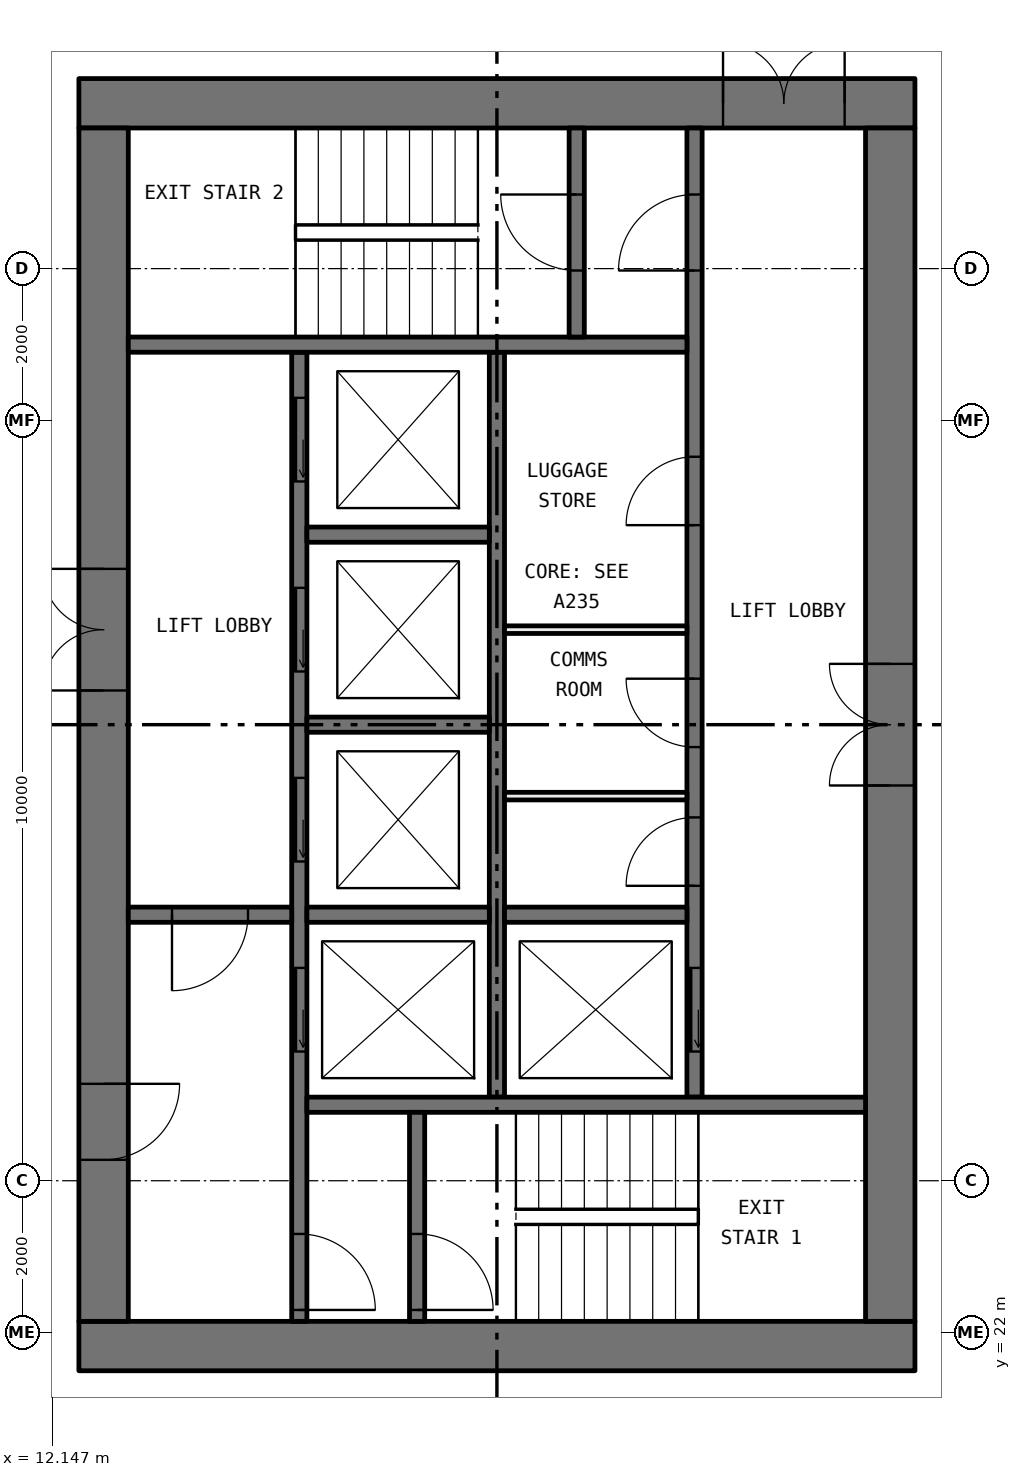
"""IFC4 building model, lengths in metres.
Left out: names, types, materials, properties, quantities, classifications, styles, units other than length and angle.
Written with IfcOpenShell. Run it as: python <this file> out.ifc"""

import sys

from ifc_helpers import new_model, si_unit, direction, frame, frame_2d, origin, place, context, subcontext, project, spatial, rectangle, extrude, element, fill, save


model = new_model("IFC4")
c1 = context("Model", 3, precision=1e-05, world=origin(), true_north=direction((0.0, 1.0)))
c2 = subcontext(c1, "Body", "Model", "MODEL_VIEW")
j1 = project(units=[si_unit("LENGTHUNIT", "METRE"), si_unit("PLANEANGLEUNIT", "RADIAN")], contexts=[c1])
p1 = place(None, origin())
s1 = spatial("IfcSite", under=j1, at=p1, CompositionType="ELEMENT")
p2 = place(p1, origin())
s2 = spatial("IfcBuilding", under=s1, at=p2, CompositionType="ELEMENT")
p3 = place(p2, frame((0.0, 0.0, 131.1)))
s3 = spatial("IfcBuildingStorey", under=s2, at=p3, CompositionType="ELEMENT", Elevation=131.1)
p4 = place(p3, frame((12.5, 21.825, 0.0), z_axis=(0.0, 0.0, 1.0), x_axis=(1.0, 0.0, 0.0)))
e1 = element("IfcWall", 1, at=p4, inside=s3, PredefinedType="SHEAR", context=c2, shape_type="SweptSolid", body=[
    extrude(rectangle(XDim=11.0, YDim=0.65, at=frame_2d((5.5, 0.0))), origin(), (0.0, 0.0, 1.0), 3.05),
])
p5 = place(p3, frame((12.5, 38.175, 0.0), z_axis=(0.0, 0.0, 1.0), x_axis=(1.0, 0.0, 0.0)))
e2 = element("IfcWall", 2, at=p5, inside=s3, PredefinedType="SHEAR", context=c2, shape_type="SweptSolid", body=[
    extrude(rectangle(XDim=11.0, YDim=0.65, at=frame_2d((5.5, 0.0))), origin(), (0.0, 0.0, 1.0), 3.05),
])
p6 = place(p5, frame((8.475, 0.0, 0.0)))
e3 = element("IfcOpeningElement", 3, at=p6, cuts=e2, PredefinedType="OPENING", context=c2, shape_type="SweptSolid", body=[
    extrude(rectangle(XDim=1.6, YDim=2.1, at=frame_2d((0.8, 1.05))), frame((0.0, 0.335, 0.0), z_axis=(0.0, -1.0, 0.0), x_axis=(1.0, 0.0, 0.0)), (0.0, 0.0, 1.0), 0.67),
])
p7 = place(p3, frame((12.825, 22.15, 0.0), z_axis=(0.0, 0.0, 1.0), x_axis=(0.0, 1.0, 0.0)))
e4 = element("IfcWall", 4, at=p7, inside=s3, PredefinedType="SHEAR", context=c2, shape_type="SweptSolid", body=[
    extrude(rectangle(XDim=15.7, YDim=0.65, at=frame_2d((7.85, 0.0))), origin(), (0.0, 0.0, 1.0), 3.05),
])
p8 = place(p7, frame((8.3, 0.0, 0.0)))
e5 = element("IfcOpeningElement", 5, at=p8, cuts=e4, PredefinedType="OPENING", context=c2, shape_type="SweptSolid", body=[
    extrude(rectangle(XDim=1.6, YDim=2.1, at=frame_2d((0.8, 1.05))), frame((0.0, 0.335, 0.0), z_axis=(0.0, -1.0, 0.0), x_axis=(1.0, 0.0, 0.0)), (0.0, 0.0, 1.0), 0.67),
])
p9 = place(p7, frame((2.125, 0.0, 0.0)))
e6 = element("IfcOpeningElement", 6, at=p9, cuts=e4, PredefinedType="OPENING", context=c2, shape_type="SweptSolid", body=[
    extrude(rectangle(XDim=1.0, YDim=2.1, at=frame_2d((0.5, 1.05))), frame((0.0, 0.335, 0.0), z_axis=(0.0, -1.0, 0.0), x_axis=(1.0, 0.0, 0.0)), (0.0, 0.0, 1.0), 0.67),
])
p10 = place(p3, frame((23.175, 22.15, 0.0), z_axis=(0.0, 0.0, 1.0), x_axis=(0.0, 1.0, 0.0)))
e7 = element("IfcWall", 7, at=p10, inside=s3, PredefinedType="SHEAR", context=c2, shape_type="SweptSolid", body=[
    extrude(rectangle(XDim=15.7, YDim=0.65, at=frame_2d((7.85, 0.0))), origin(), (0.0, 0.0, 1.0), 3.05),
])
p11 = place(p10, frame((7.05, 0.0, 0.0)))
e8 = element("IfcOpeningElement", 8, at=p11, cuts=e7, PredefinedType="OPENING", context=c2, shape_type="SweptSolid", body=[
    extrude(rectangle(XDim=1.6, YDim=2.1, at=frame_2d((0.8, 1.05))), frame((0.0, 0.335, 0.0), z_axis=(0.0, -1.0, 0.0), x_axis=(1.0, 0.0, 0.0)), (0.0, 0.0, 1.0), 0.67),
])
p12 = place(p3, frame((15.4, 22.15, 0.0), z_axis=(0.0, 0.0, 1.0), x_axis=(0.0, 1.0, 0.0)))
e9 = element("IfcWall", 9, at=p12, inside=s3, PredefinedType="SOLIDWALL", context=c2, shape_type="SweptSolid", body=[
    extrude(rectangle(XDim=12.75, YDim=0.2, at=frame_2d((6.375, 0.0))), origin(), (0.0, 0.0, 1.0), 3.05),
])
p13 = place(p12, frame((3.55, 0.0, 0.0)))
e10 = element("IfcOpeningElement", 10, at=p13, cuts=e9, PredefinedType="OPENING", context=c2, shape_type="SweptSolid", body=[
    extrude(rectangle(XDim=1.1, YDim=2.1, at=frame_2d((0.55, 1.05))), frame((0.0, 0.11, 0.0), z_axis=(0.0, -1.0, 0.0), x_axis=(1.0, 0.0, 0.0)), (0.0, 0.0, 1.0), 0.22),
])
p14 = place(p12, frame((6.05, 0.0, 0.0)))
e11 = element("IfcOpeningElement", 11, at=p14, cuts=e9, PredefinedType="OPENING", context=c2, shape_type="SweptSolid", body=[
    extrude(rectangle(XDim=1.1, YDim=2.1, at=frame_2d((0.55, 1.05))), frame((0.0, 0.11, 0.0), z_axis=(0.0, -1.0, 0.0), x_axis=(1.0, 0.0, 0.0)), (0.0, 0.0, 1.0), 0.22),
])
p15 = place(p12, frame((8.55, 0.0, 0.0)))
e12 = element("IfcOpeningElement", 12, at=p15, cuts=e9, PredefinedType="OPENING", context=c2, shape_type="SweptSolid", body=[
    extrude(rectangle(XDim=1.1, YDim=2.1, at=frame_2d((0.55, 1.05))), frame((0.0, 0.11, 0.0), z_axis=(0.0, -1.0, 0.0), x_axis=(1.0, 0.0, 0.0)), (0.0, 0.0, 1.0), 0.22),
])
p16 = place(p12, frame((11.05, 0.0, 0.0)))
e13 = element("IfcOpeningElement", 13, at=p16, cuts=e9, PredefinedType="OPENING", context=c2, shape_type="SweptSolid", body=[
    extrude(rectangle(XDim=1.1, YDim=2.1, at=frame_2d((0.55, 1.05))), frame((0.0, 0.11, 0.0), z_axis=(0.0, -1.0, 0.0), x_axis=(1.0, 0.0, 0.0)), (0.0, 0.0, 1.0), 0.22),
])
p17 = place(p12, frame((0.15, 0.0, 0.0)))
e14 = element("IfcOpeningElement", 14, at=p17, cuts=e9, PredefinedType="OPENING", context=c2, shape_type="SweptSolid", body=[
    extrude(rectangle(XDim=1.0, YDim=2.1, at=frame_2d((0.5, 1.05))), frame((0.0, 0.11, 0.0), z_axis=(0.0, -1.0, 0.0), x_axis=(1.0, 0.0, 0.0)), (0.0, 0.0, 1.0), 0.22),
])
p18 = place(p3, frame((20.6, 25.1, 0.0), z_axis=(0.0, 0.0, 1.0), x_axis=(0.0, 1.0, 0.0)))
e15 = element("IfcWall", 15, at=p18, inside=s3, PredefinedType="SOLIDWALL", context=c2, shape_type="SweptSolid", body=[
    extrude(rectangle(XDim=12.75, YDim=0.2, at=frame_2d((6.375, 0.0))), origin(), (0.0, 0.0, 1.0), 3.05),
])
p19 = place(p18, frame((0.6, 0.0, 0.0)))
e16 = element("IfcOpeningElement", 16, at=p19, cuts=e15, PredefinedType="OPENING", context=c2, shape_type="SweptSolid", body=[
    extrude(rectangle(XDim=1.1, YDim=2.1, at=frame_2d((0.55, 1.05))), frame((0.0, 0.11, 0.0), z_axis=(0.0, -1.0, 0.0), x_axis=(1.0, 0.0, 0.0)), (0.0, 0.0, 1.0), 0.22),
])
p20 = place(p18, frame((10.875, 0.0, 0.0)))
e17 = element("IfcOpeningElement", 17, at=p20, cuts=e15, PredefinedType="OPENING", context=c2, shape_type="SweptSolid", body=[
    extrude(rectangle(XDim=1.0, YDim=2.1, at=frame_2d((0.5, 1.05))), frame((0.0, 0.11, 0.0), z_axis=(0.0, -1.0, 0.0), x_axis=(1.0, 0.0, 0.0)), (0.0, 0.0, 1.0), 0.22),
])
p21 = place(p18, frame((2.78, 0.0, 0.0)))
e18 = element("IfcOpeningElement", 18, at=p21, cuts=e15, PredefinedType="OPENING", context=c2, shape_type="SweptSolid", body=[
    extrude(rectangle(XDim=0.9, YDim=2.1, at=frame_2d((0.45, 1.05))), frame((0.0, 0.11, 0.0), z_axis=(0.0, -1.0, 0.0), x_axis=(1.0, 0.0, 0.0)), (0.0, 0.0, 1.0), 0.22),
])
p22 = place(p18, frame((4.605, 0.0, 0.0)))
e19 = element("IfcOpeningElement", 19, at=p22, cuts=e15, PredefinedType="OPENING", context=c2, shape_type="SweptSolid", body=[
    extrude(rectangle(XDim=0.9, YDim=2.1, at=frame_2d((0.45, 1.05))), frame((0.0, 0.11, 0.0), z_axis=(0.0, -1.0, 0.0), x_axis=(1.0, 0.0, 0.0)), (0.0, 0.0, 1.0), 0.22),
])
p23 = place(p18, frame((7.525, 0.0, 0.0)))
e20 = element("IfcOpeningElement", 20, at=p23, cuts=e15, PredefinedType="OPENING", context=c2, shape_type="SweptSolid", body=[
    extrude(rectangle(XDim=0.9, YDim=2.1, at=frame_2d((0.45, 1.05))), frame((0.0, 0.11, 0.0), z_axis=(0.0, -1.0, 0.0), x_axis=(1.0, 0.0, 0.0)), (0.0, 0.0, 1.0), 0.22),
])
p24 = place(p3, frame((18.0, 25.1, 0.0), z_axis=(0.0, 0.0, 1.0), x_axis=(0.0, 1.0, 0.0)))
e21 = element("IfcWall", 21, at=p24, inside=s3, PredefinedType="SOLIDWALL", context=c2, shape_type="SweptSolid", body=[
    extrude(rectangle(XDim=9.8, YDim=0.2, at=frame_2d((4.9, 0.0))), origin(), (0.0, 0.0, 1.0), 3.05),
])
for number, where, z_axis, x_axis in (
    (22, (15.5, 25.0, 0.0), (0.0, 0.0, 1.0), (1.0, 0.0, 0.0)),
    (23, (13.15, 35.0, 0.0), (0.0, 0.0, 1.0), (1.0, 0.0, 0.0)),
):
    element("IfcWall", number, at=place(p3, frame(where, z_axis=z_axis, x_axis=x_axis)), inside=s3, PredefinedType="SOLIDWALL", context=c2, shape_type="SweptSolid", body=[
        extrude(rectangle(XDim=7.35, YDim=0.2, at=frame_2d((3.675, 0.0))), origin(), (0.0, 0.0, 1.0), 3.05),
    ])
p25 = place(p3, frame((13.15, 27.5, 0.0), z_axis=(0.0, 0.0, 1.0), x_axis=(1.0, 0.0, 0.0)))
e24 = element("IfcWall", 24, at=p25, inside=s3, PredefinedType="SOLIDWALL", context=c2, shape_type="SweptSolid", body=[
    extrude(rectangle(XDim=2.15, YDim=0.2, at=frame_2d((1.075, 0.0))), origin(), (0.0, 0.0, 1.0), 3.05),
])
p26 = place(p25, frame((0.575, 0.0, 0.0)))
e25 = element("IfcOpeningElement", 25, at=p26, cuts=e24, PredefinedType="OPENING", context=c2, shape_type="SweptSolid", body=[
    extrude(rectangle(XDim=1.0, YDim=2.1, at=frame_2d((0.5, 1.05))), frame((0.0, 0.11, 0.0), z_axis=(0.0, -1.0, 0.0), x_axis=(1.0, 0.0, 0.0)), (0.0, 0.0, 1.0), 0.22),
])
p27 = place(p3, frame((16.95, 22.15, 0.0), z_axis=(0.0, 0.0, 1.0), x_axis=(0.0, 1.0, 0.0)))
e26 = element("IfcWall", 26, at=p27, inside=s3, PredefinedType="SOLIDWALL", context=c2, shape_type="SweptSolid", body=[
    extrude(rectangle(XDim=2.75, YDim=0.2, at=frame_2d((1.375, 0.0))), origin(), (0.0, 0.0, 1.0), 3.05),
])
p28 = place(p27, frame((0.15, 0.0, 0.0)))
e27 = element("IfcOpeningElement", 27, at=p28, cuts=e26, PredefinedType="OPENING", context=c2, shape_type="SweptSolid", body=[
    extrude(rectangle(XDim=1.0, YDim=2.1, at=frame_2d((0.5, 1.05))), frame((0.0, 0.11, 0.0), z_axis=(0.0, -1.0, 0.0), x_axis=(1.0, 0.0, 0.0)), (0.0, 0.0, 1.0), 0.22),
])
p29 = place(p3, frame((19.05, 35.1, 0.0), z_axis=(0.0, 0.0, 1.0), x_axis=(0.0, 1.0, 0.0)))
e28 = element("IfcWall", 28, at=p29, inside=s3, PredefinedType="SOLIDWALL", context=c2, shape_type="SweptSolid", body=[
    extrude(rectangle(XDim=2.75, YDim=0.2, at=frame_2d((1.375, 0.0))), origin(), (0.0, 0.0, 1.0), 3.05),
])
p30 = place(p29, frame((0.875, 0.0, 0.0)))
e29 = element("IfcOpeningElement", 29, at=p30, cuts=e28, PredefinedType="OPENING", context=c2, shape_type="SweptSolid", body=[
    extrude(rectangle(XDim=1.0, YDim=2.1, at=frame_2d((0.5, 1.05))), frame((0.0, 0.11, 0.0), z_axis=(0.0, -1.0, 0.0), x_axis=(1.0, 0.0, 0.0)), (0.0, 0.0, 1.0), 0.22),
])
for number, where, z_axis, x_axis in (
    (30, (15.5, 27.5, 0.0), (0.0, 0.0, 1.0), (1.0, 0.0, 0.0)),
    (31, (15.5, 30.0, 0.0), (0.0, 0.0, 1.0), (1.0, 0.0, 0.0)),
    (32, (15.5, 32.5, 0.0), (0.0, 0.0, 1.0), (1.0, 0.0, 0.0)),
    (33, (18.1, 27.5, 0.0), (0.0, 0.0, 1.0), (1.0, 0.0, 0.0)),
):
    element("IfcWall", number, at=place(p3, frame(where, z_axis=z_axis, x_axis=x_axis)), inside=s3, PredefinedType="SOLIDWALL", context=c2, shape_type="SweptSolid", body=[
        extrude(rectangle(XDim=2.4, YDim=0.2, at=frame_2d((1.2, 0.0))), origin(), (0.0, 0.0, 1.0), 3.05),
    ])
for number, where, z_axis, x_axis in (
    (34, (18.1, 29.06, 0.0), (0.0, 0.0, 1.0), (1.0, 0.0, 0.0)),
    (35, (18.1, 31.25, 0.0), (0.0, 0.0, 1.0), (1.0, 0.0, 0.0)),
):
    element("IfcWall", number, at=place(p3, frame(where, z_axis=z_axis, x_axis=x_axis)), inside=s3, PredefinedType="PARTITIONING", context=c2, shape_type="SweptSolid", body=[
        extrude(rectangle(XDim=2.4, YDim=0.1, at=frame_2d((1.2, 0.0))), origin(), (0.0, 0.0, 1.0), 3.05),
    ])
p31 = place(p19, origin())
e36 = element("IfcDoor", 36, at=p31, inside=s3, OperationType="SLIDING_TO_LEFT", PredefinedType="DOOR", context=c2, shape_type="SweptSolid", body=[
    extrude(rectangle(XDim=1.1, YDim=2.1, at=frame_2d((0.55, 1.05))), frame((0.0, 0.025, 0.0), z_axis=(0.0, -1.0, 0.0), x_axis=(1.0, 0.0, 0.0)), (0.0, 0.0, 1.0), 0.05),
])
fill(e16, e36)
p32 = place(p13, origin())
e37 = element("IfcDoor", 37, at=p32, inside=s3, OperationType="SLIDING_TO_LEFT", PredefinedType="DOOR", context=c2, shape_type="SweptSolid", body=[
    extrude(rectangle(XDim=1.1, YDim=2.1, at=frame_2d((0.55, 1.05))), frame((0.0, 0.025, 0.0), z_axis=(0.0, -1.0, 0.0), x_axis=(1.0, 0.0, 0.0)), (0.0, 0.0, 1.0), 0.05),
])
fill(e10, e37)
p33 = place(p14, origin())
e38 = element("IfcDoor", 38, at=p33, inside=s3, OperationType="SLIDING_TO_LEFT", PredefinedType="DOOR", context=c2, shape_type="SweptSolid", body=[
    extrude(rectangle(XDim=1.1, YDim=2.1, at=frame_2d((0.55, 1.05))), frame((0.0, 0.025, 0.0), z_axis=(0.0, -1.0, 0.0), x_axis=(1.0, 0.0, 0.0)), (0.0, 0.0, 1.0), 0.05),
])
fill(e11, e38)
p34 = place(p15, origin())
e39 = element("IfcDoor", 39, at=p34, inside=s3, OperationType="SLIDING_TO_LEFT", PredefinedType="DOOR", context=c2, shape_type="SweptSolid", body=[
    extrude(rectangle(XDim=1.1, YDim=2.1, at=frame_2d((0.55, 1.05))), frame((0.0, 0.025, 0.0), z_axis=(0.0, -1.0, 0.0), x_axis=(1.0, 0.0, 0.0)), (0.0, 0.0, 1.0), 0.05),
])
fill(e12, e39)
p35 = place(p16, origin())
e40 = element("IfcDoor", 40, at=p35, inside=s3, OperationType="SLIDING_TO_LEFT", PredefinedType="DOOR", context=c2, shape_type="SweptSolid", body=[
    extrude(rectangle(XDim=1.1, YDim=2.1, at=frame_2d((0.55, 1.05))), frame((0.0, 0.025, 0.0), z_axis=(0.0, -1.0, 0.0), x_axis=(1.0, 0.0, 0.0)), (0.0, 0.0, 1.0), 0.05),
])
fill(e13, e40)
p36 = place(p28, frame((1.0, 0.0, 0.0), x_axis=(-1.0, 0.0, 0.0)))
e41 = element("IfcDoor", 41, at=p36, inside=s3, OperationType="SINGLE_SWING_LEFT", PredefinedType="DOOR", context=c2, shape_type="SweptSolid", body=[
    extrude(rectangle(XDim=1.0, YDim=2.1, at=frame_2d((0.5, 1.05))), frame((0.0, 0.025, 0.0), z_axis=(0.0, -1.0, 0.0), x_axis=(1.0, 0.0, 0.0)), (0.0, 0.0, 1.0), 0.05),
])
fill(e27, e41)
p37 = place(p17, frame((1.0, 0.0, 0.0), x_axis=(-1.0, 0.0, 0.0)))
e42 = element("IfcDoor", 42, at=p37, inside=s3, OperationType="SINGLE_SWING_LEFT", PredefinedType="DOOR", context=c2, shape_type="SweptSolid", body=[
    extrude(rectangle(XDim=1.0, YDim=2.1, at=frame_2d((0.5, 1.05))), frame((0.0, 0.025, 0.0), z_axis=(0.0, -1.0, 0.0), x_axis=(1.0, 0.0, 0.0)), (0.0, 0.0, 1.0), 0.05),
])
fill(e14, e42)
p38 = place(p20, origin())
e43 = element("IfcDoor", 43, at=p38, inside=s3, OperationType="SINGLE_SWING_RIGHT", PredefinedType="DOOR", context=c2, shape_type="SweptSolid", body=[
    extrude(rectangle(XDim=1.0, YDim=2.1, at=frame_2d((0.5, 1.05))), frame((0.0, 0.025, 0.0), z_axis=(0.0, -1.0, 0.0), x_axis=(1.0, 0.0, 0.0)), (0.0, 0.0, 1.0), 0.05),
])
fill(e17, e43)
p39 = place(p30, origin())
e44 = element("IfcDoor", 44, at=p39, inside=s3, OperationType="SINGLE_SWING_LEFT", PredefinedType="DOOR", context=c2, shape_type="SweptSolid", body=[
    extrude(rectangle(XDim=1.0, YDim=2.1, at=frame_2d((0.5, 1.05))), frame((0.0, 0.025, 0.0), z_axis=(0.0, -1.0, 0.0), x_axis=(1.0, 0.0, 0.0)), (0.0, 0.0, 1.0), 0.05),
])
fill(e29, e44)
p40 = place(p26, frame((1.0, 0.0, 0.0), x_axis=(-1.0, 0.0, 0.0)))
e45 = element("IfcDoor", 45, at=p40, inside=s3, OperationType="SINGLE_SWING_LEFT", PredefinedType="DOOR", context=c2, shape_type="SweptSolid", body=[
    extrude(rectangle(XDim=1.0, YDim=2.1, at=frame_2d((0.5, 1.05))), frame((0.0, 0.025, 0.0), z_axis=(0.0, -1.0, 0.0), x_axis=(1.0, 0.0, 0.0)), (0.0, 0.0, 1.0), 0.05),
])
fill(e25, e45)
p41 = place(p8, origin())
e46 = element("IfcDoor", 46, at=p41, inside=s3, OperationType="DOUBLE_DOOR_SINGLE_SWING", PredefinedType="DOOR", context=c2, shape_type="SweptSolid", body=[
    extrude(rectangle(XDim=1.6, YDim=2.1, at=frame_2d((0.8, 1.05))), frame((0.0, 0.025, 0.0), z_axis=(0.0, -1.0, 0.0), x_axis=(1.0, 0.0, 0.0)), (0.0, 0.0, 1.0), 0.05),
])
fill(e5, e46)
p42 = place(p9, frame((1.0, 0.0, 0.0), x_axis=(-1.0, 0.0, 0.0)))
e47 = element("IfcDoor", 47, at=p42, inside=s3, OperationType="SINGLE_SWING_RIGHT", PredefinedType="DOOR", context=c2, shape_type="SweptSolid", body=[
    extrude(rectangle(XDim=1.0, YDim=2.1, at=frame_2d((0.5, 1.05))), frame((0.0, 0.025, 0.0), z_axis=(0.0, -1.0, 0.0), x_axis=(1.0, 0.0, 0.0)), (0.0, 0.0, 1.0), 0.05),
])
fill(e6, e47)
p43 = place(p6, origin())
e48 = element("IfcDoor", 48, at=p43, inside=s3, OperationType="DOUBLE_DOOR_SINGLE_SWING", PredefinedType="DOOR", context=c2, shape_type="SweptSolid", body=[
    extrude(rectangle(XDim=1.6, YDim=2.1, at=frame_2d((0.8, 1.05))), frame((0.0, 0.025, 0.0), z_axis=(0.0, -1.0, 0.0), x_axis=(1.0, 0.0, 0.0)), (0.0, 0.0, 1.0), 0.05),
])
fill(e3, e48)
p44 = place(p11, origin())
e49 = element("IfcDoor", 49, at=p44, inside=s3, OperationType="DOUBLE_DOOR_SINGLE_SWING", PredefinedType="DOOR", context=c2, shape_type="SweptSolid", body=[
    extrude(rectangle(XDim=1.6, YDim=2.1, at=frame_2d((0.8, 1.05))), frame((0.0, 0.025, 0.0), z_axis=(0.0, -1.0, 0.0), x_axis=(1.0, 0.0, 0.0)), (0.0, 0.0, 1.0), 0.05),
])
fill(e8, e49)
p45 = place(p21, origin())
e50 = element("IfcDoor", 50, at=p45, inside=s3, OperationType="SINGLE_SWING_RIGHT", PredefinedType="DOOR", context=c2, shape_type="SweptSolid", body=[
    extrude(rectangle(XDim=0.9, YDim=2.1, at=frame_2d((0.45, 1.05))), frame((0.0, 0.025, 0.0), z_axis=(0.0, -1.0, 0.0), x_axis=(1.0, 0.0, 0.0)), (0.0, 0.0, 1.0), 0.05),
])
fill(e18, e50)
p46 = place(p22, origin())
e51 = element("IfcDoor", 51, at=p46, inside=s3, OperationType="SINGLE_SWING_LEFT", PredefinedType="DOOR", context=c2, shape_type="SweptSolid", body=[
    extrude(rectangle(XDim=0.9, YDim=2.1, at=frame_2d((0.45, 1.05))), frame((0.0, 0.025, 0.0), z_axis=(0.0, -1.0, 0.0), x_axis=(1.0, 0.0, 0.0)), (0.0, 0.0, 1.0), 0.05),
])
fill(e19, e51)
p47 = place(p23, origin())
e52 = element("IfcDoor", 52, at=p47, inside=s3, OperationType="SINGLE_SWING_RIGHT", PredefinedType="DOOR", context=c2, shape_type="SweptSolid", body=[
    extrude(rectangle(XDim=0.9, YDim=2.1, at=frame_2d((0.45, 1.05))), frame((0.0, 0.025, 0.0), z_axis=(0.0, -1.0, 0.0), x_axis=(1.0, 0.0, 0.0)), (0.0, 0.0, 1.0), 0.05),
])
fill(e20, e52)
save(model, sys.argv[1])
